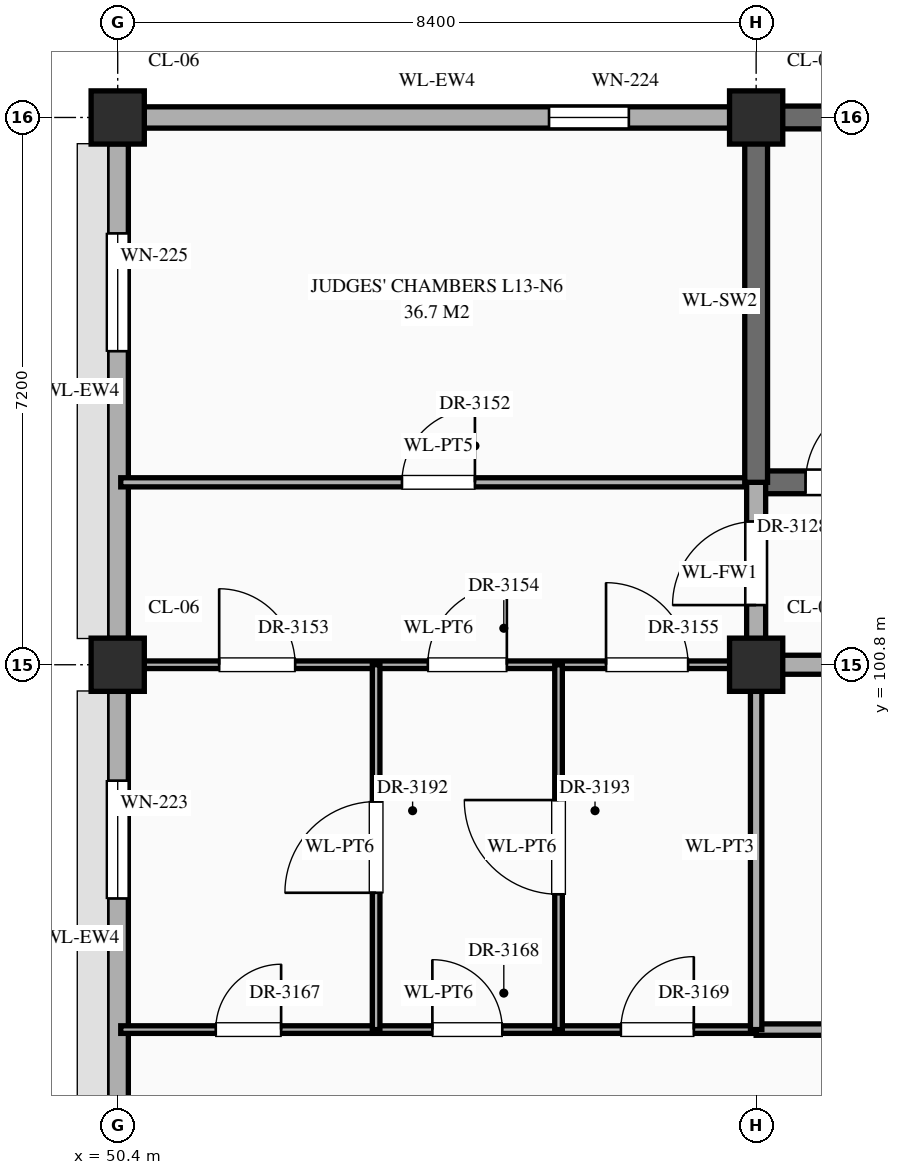
"""IFC4 building model, lengths in metres.
Left out: names, types, materials, properties, quantities, classifications, styles, units other than length and angle.
Written with IfcOpenShell. Run it as: python <this file> out.ifc"""

import sys

from ifc_helpers import new_model, si_unit, direction, frame, frame_2d, origin, origin_2d, place, context, subcontext, project, spatial, rectangle, extrude, element, fill, save


model = new_model("IFC4")
c1 = context("Model", 3, precision=1e-05, world=origin(), true_north=direction((0.0, 1.0)))
c2 = subcontext(c1, "Body", "Model", "MODEL_VIEW")
j1 = project(units=[si_unit("LENGTHUNIT", "METRE"), si_unit("PLANEANGLEUNIT", "RADIAN")], contexts=[c1])
p1 = place(None, origin())
s1 = spatial("IfcSite", under=j1, at=p1, CompositionType="ELEMENT")
p2 = place(p1, origin())
s2 = spatial("IfcBuilding", under=s1, at=p2, CompositionType="ELEMENT")
p3 = place(p2, frame((0.0, 0.0, 56.1)))
s3 = spatial("IfcBuildingStorey", under=s2, at=p3, CompositionType="ELEMENT", Elevation=56.1)
for number, where, z_axis, x_axis in (
    (1, (50.4, 100.8, 0.0), (0.0, 0.0, 1.0), (1.0, 0.0, 0.0)),
    (2, (50.4, 108.0, 0.0), (0.0, 0.0, 1.0), (1.0, 0.0, 0.0)),
    (3, (58.8, 100.8, 0.0), (0.0, 0.0, 1.0), (1.0, 0.0, 0.0)),
    (4, (58.8, 108.0, 0.0), (0.0, 0.0, 1.0), (1.0, 0.0, 0.0)),
):
    element("IfcColumn", number, at=place(p3, frame(where, z_axis=z_axis, x_axis=x_axis)), inside=s3, PredefinedType="COLUMN", context=c2, shape_type="SweptSolid", body=[
        extrude(rectangle(XDim=0.7, YDim=0.7, at=origin_2d()), origin(), (0.0, 0.0, 1.0), 4.2),
    ])
p4 = place(p3, frame((50.4, 93.945, 0.0), z_axis=(0.0, 0.0, 1.0), x_axis=(0.0, 1.0, 0.0)))
e5 = element("IfcWall", 5, at=p4, inside=s3, PredefinedType="STANDARD", context=c2, shape_type="SweptSolid", body=[
    extrude(rectangle(XDim=6.51, YDim=0.28, at=frame_2d((3.255, 0.0))), origin(), (0.0, 0.0, 1.0), 3.2),
])
p5 = place(p4, frame((3.78, 0.0, 0.55)))
e6 = element("IfcOpeningElement", 6, at=p5, cuts=e5, PredefinedType="OPENING", context=c2, shape_type="SweptSolid", body=[
    extrude(rectangle(XDim=1.55, YDim=1.92, at=frame_2d((0.775, 0.96))), frame((0.0, 0.152, 0.0), z_axis=(0.0, -1.0, 0.0), x_axis=(1.0, 0.0, 0.0)), (0.0, 0.0, 1.0), 0.304),
])
p6 = place(p3, frame((50.745, 108.0, 0.0), z_axis=(0.0, 0.0, 1.0), x_axis=(1.0, 0.0, 0.0)))
e7 = element("IfcWall", 7, at=p6, inside=s3, PredefinedType="STANDARD", context=c2, shape_type="SweptSolid", body=[
    extrude(rectangle(XDim=7.71, YDim=0.28, at=frame_2d((3.855, 0.0))), origin(), (0.0, 0.0, 1.0), 3.2),
])
p7 = place(p6, frame((5.33, 0.0, 0.55)))
e8 = element("IfcOpeningElement", 8, at=p7, cuts=e7, PredefinedType="OPENING", context=c2, shape_type="SweptSolid", body=[
    extrude(rectangle(XDim=1.05, YDim=2.12, at=frame_2d((0.525, 1.06))), frame((0.0, 0.152, 0.0), z_axis=(0.0, -1.0, 0.0), x_axis=(1.0, 0.0, 0.0)), (0.0, 0.0, 1.0), 0.304),
])
p8 = place(p3, frame((50.4, 101.145, 0.0), z_axis=(0.0, 0.0, 1.0), x_axis=(0.0, 1.0, 0.0)))
e9 = element("IfcWall", 9, at=p8, inside=s3, PredefinedType="STANDARD", context=c2, shape_type="SweptSolid", body=[
    extrude(rectangle(XDim=6.51, YDim=0.28, at=frame_2d((3.255, 0.0))), origin(), (0.0, 0.0, 1.0), 3.2),
])
p9 = place(p8, frame((3.78, 0.0, 0.55)))
e10 = element("IfcOpeningElement", 10, at=p9, cuts=e9, PredefinedType="OPENING", context=c2, shape_type="SweptSolid", body=[
    extrude(rectangle(XDim=1.55, YDim=2.12, at=frame_2d((0.775, 1.06))), frame((0.0, 0.152, 0.0), z_axis=(0.0, -1.0, 0.0), x_axis=(1.0, 0.0, 0.0)), (0.0, 0.0, 1.0), 0.304),
])
p10 = place(p3, frame((59.145, 108.0, 0.0), z_axis=(0.0, 0.0, 1.0), x_axis=(1.0, 0.0, 0.0)))
e11 = element("IfcWall", 11, at=p10, inside=s3, PredefinedType="SHEAR", context=c2, shape_type="SweptSolid", body=[
    extrude(rectangle(XDim=7.71, YDim=0.3, at=frame_2d((3.855, 0.0))), origin(), (0.0, 0.0, 1.0), 3.96),
])
p11 = place(p3, frame((50.44, 96.0, 0.0), z_axis=(0.0, 0.0, 1.0), x_axis=(1.0, 0.0, 0.0)))
e12 = element("IfcWall", 12, at=p11, inside=s3, PredefinedType="STANDARD", context=c2, shape_type="SweptSolid", body=[
    extrude(rectangle(XDim=8.36, YDim=0.1, at=frame_2d((4.18, 0.0))), origin(), (0.0, 0.0, 1.0), 3.85),
])
p12 = place(p11, frame((1.25, 0.0, 0.0)))
e13 = element("IfcOpeningElement", 13, at=p12, cuts=e12, PredefinedType="OPENING", context=c2, shape_type="SweptSolid", body=[
    extrude(rectangle(XDim=0.86, YDim=2.1, at=frame_2d((0.43, 1.05))), frame((0.0, 0.062, 0.0), z_axis=(0.0, -1.0, 0.0), x_axis=(1.0, 0.0, 0.0)), (0.0, 0.0, 1.0), 0.124),
])
p13 = place(p11, frame((4.1, 0.0, 0.0)))
e14 = element("IfcOpeningElement", 14, at=p13, cuts=e12, PredefinedType="OPENING", context=c2, shape_type="SweptSolid", body=[
    extrude(rectangle(XDim=0.92, YDim=2.15, at=frame_2d((0.46, 1.075))), frame((0.0, 0.062, 0.0), z_axis=(0.0, -1.0, 0.0), x_axis=(1.0, 0.0, 0.0)), (0.0, 0.0, 1.0), 0.124),
])
p14 = place(p11, frame((6.58, 0.0, 0.0)))
e15 = element("IfcOpeningElement", 15, at=p14, cuts=e12, PredefinedType="OPENING", context=c2, shape_type="SweptSolid", body=[
    extrude(rectangle(XDim=0.96, YDim=2.2, at=frame_2d((0.48, 1.1))), frame((0.0, 0.062, 0.0), z_axis=(0.0, -1.0, 0.0), x_axis=(1.0, 0.0, 0.0)), (0.0, 0.0, 1.0), 0.124),
])
p15 = place(p3, frame((58.8, 96.0, 0.0), z_axis=(0.0, 0.0, 1.0), x_axis=(1.0, 0.0, 0.0)))
e16 = element("IfcWall", 16, at=p15, inside=s3, PredefinedType="STANDARD", context=c2, shape_type="SweptSolid", body=[
    extrude(rectangle(XDim=25.2, YDim=0.15, at=frame_2d((12.6, 0.0))), origin(), (0.0, 0.0, 1.0), 3.96),
])
p16 = place(p15, frame((3.7, 0.0, 0.0)))
e17 = element("IfcOpeningElement", 17, at=p16, cuts=e16, PredefinedType="OPENING", context=c2, shape_type="SweptSolid", body=[
    extrude(rectangle(XDim=1.0, YDim=2.25, at=frame_2d((0.5, 1.125))), frame((0.0, 0.087, 0.0), z_axis=(0.0, -1.0, 0.0), x_axis=(1.0, 0.0, 0.0)), (0.0, 0.0, 1.0), 0.174),
])
p17 = place(p15, frame((12.08, 0.0, 0.0)))
e18 = element("IfcOpeningElement", 18, at=p17, cuts=e16, PredefinedType="OPENING", context=c2, shape_type="SweptSolid", body=[
    extrude(rectangle(XDim=1.04, YDim=2.2, at=frame_2d((0.52, 1.1))), frame((0.0, 0.087, 0.0), z_axis=(0.0, -1.0, 0.0), x_axis=(1.0, 0.0, 0.0)), (0.0, 0.0, 1.0), 0.174),
])
p18 = place(p15, frame((20.46, 0.0, 0.0)))
e19 = element("IfcOpeningElement", 19, at=p18, cuts=e16, PredefinedType="OPENING", context=c2, shape_type="SweptSolid", body=[
    extrude(rectangle(XDim=1.08, YDim=2.25, at=frame_2d((0.54, 1.125))), frame((0.0, 0.087, 0.0), z_axis=(0.0, -1.0, 0.0), x_axis=(1.0, 0.0, 0.0)), (0.0, 0.0, 1.0), 0.174),
])
p19 = place(p3, frame((50.44, 100.8, 0.0), z_axis=(0.0, 0.0, 1.0), x_axis=(1.0, 0.0, 0.0)))
e20 = element("IfcWall", 20, at=p19, inside=s3, PredefinedType="STANDARD", context=c2, shape_type="SweptSolid", body=[
    extrude(rectangle(XDim=8.36, YDim=0.1, at=frame_2d((4.18, 0.0))), origin(), (0.0, 0.0, 1.0), 3.0),
])
p20 = place(p19, frame((1.295, 0.0, 0.0)))
e21 = element("IfcOpeningElement", 21, at=p20, cuts=e20, PredefinedType="OPENING", context=c2, shape_type="SweptSolid", body=[
    extrude(rectangle(XDim=1.0, YDim=2.25, at=frame_2d((0.5, 1.125))), frame((0.0, 0.062, 0.0), z_axis=(0.0, -1.0, 0.0), x_axis=(1.0, 0.0, 0.0)), (0.0, 0.0, 1.0), 0.124),
])
p21 = place(p19, frame((4.04, 0.0, 0.0)))
e22 = element("IfcOpeningElement", 22, at=p21, cuts=e20, PredefinedType="OPENING", context=c2, shape_type="SweptSolid", body=[
    extrude(rectangle(XDim=1.04, YDim=2.2, at=frame_2d((0.52, 1.1))), frame((0.0, 0.062, 0.0), z_axis=(0.0, -1.0, 0.0), x_axis=(1.0, 0.0, 0.0)), (0.0, 0.0, 1.0), 0.124),
])
p22 = place(p19, frame((6.385, 0.0, 0.0)))
e23 = element("IfcOpeningElement", 23, at=p22, cuts=e20, PredefinedType="OPENING", context=c2, shape_type="SweptSolid", body=[
    extrude(rectangle(XDim=1.08, YDim=2.25, at=frame_2d((0.54, 1.125))), frame((0.0, 0.062, 0.0), z_axis=(0.0, -1.0, 0.0), x_axis=(1.0, 0.0, 0.0)), (0.0, 0.0, 1.0), 0.124),
])
p23 = place(p3, frame((58.8, 100.8, 0.0), z_axis=(0.0, 0.0, 1.0), x_axis=(1.0, 0.0, 0.0)))
e24 = element("IfcWall", 24, at=p23, inside=s3, PredefinedType="STANDARD", context=c2, shape_type="SweptSolid", body=[
    extrude(rectangle(XDim=12.6, YDim=0.25, at=frame_2d((6.3, 0.0))), origin(), (0.0, 0.0, 1.0), 3.11),
])
p24 = place(p23, frame((3.7, 0.0, 0.0)))
e25 = element("IfcOpeningElement", 25, at=p24, cuts=e24, PredefinedType="OPENING", context=c2, shape_type="SweptSolid", body=[
    extrude(rectangle(XDim=1.0, YDim=2.2, at=frame_2d((0.5, 1.1))), frame((0.0, 0.137, 0.0), z_axis=(0.0, -1.0, 0.0), x_axis=(1.0, 0.0, 0.0)), (0.0, 0.0, 1.0), 0.274),
])
p25 = place(p3, frame((50.44, 103.2, 0.0), z_axis=(0.0, 0.0, 1.0), x_axis=(1.0, 0.0, 0.0)))
e26 = element("IfcWall", 26, at=p25, inside=s3, PredefinedType="STANDARD", context=c2, shape_type="SweptSolid", body=[
    extrude(rectangle(XDim=8.36, YDim=0.12, at=frame_2d((4.18, 0.0))), origin(), (0.0, 0.0, 1.0), 3.85),
])
p26 = place(p25, frame((3.7, 0.0, 0.0)))
e27 = element("IfcOpeningElement", 27, at=p26, cuts=e26, PredefinedType="OPENING", context=c2, shape_type="SweptSolid", body=[
    extrude(rectangle(XDim=0.96, YDim=2.2, at=frame_2d((0.48, 1.1))), frame((0.0, 0.072, 0.0), z_axis=(0.0, -1.0, 0.0), x_axis=(1.0, 0.0, 0.0)), (0.0, 0.0, 1.0), 0.144),
])
p27 = place(p3, frame((58.8, 103.2, 0.0), z_axis=(0.0, 0.0, 1.0), x_axis=(1.0, 0.0, 0.0)))
e28 = element("IfcWall", 28, at=p27, inside=s3, PredefinedType="SHEAR", context=c2, shape_type="SweptSolid", body=[
    extrude(rectangle(XDim=8.4, YDim=0.3, at=frame_2d((4.2, 0.0))), origin(), (0.0, 0.0, 1.0), 3.96),
])
p28 = place(p27, frame((0.65, 0.0, 0.0)))
e29 = element("IfcOpeningElement", 29, at=p28, cuts=e28, PredefinedType="OPENING", context=c2, shape_type="SweptSolid", body=[
    extrude(rectangle(XDim=1.1, YDim=2.2, at=frame_2d((0.55, 1.1))), frame((0.0, 0.162, 0.0), z_axis=(0.0, -1.0, 0.0), x_axis=(1.0, 0.0, 0.0)), (0.0, 0.0, 1.0), 0.324),
])
p29 = place(p3, frame((53.8, 96.0, 0.0), z_axis=(0.0, 0.0, 1.0), x_axis=(0.0, 1.0, 0.0)))
e30 = element("IfcWall", 30, at=p29, inside=s3, PredefinedType="STANDARD", context=c2, shape_type="SweptSolid", body=[
    extrude(rectangle(XDim=4.8, YDim=0.1, at=frame_2d((2.4, 0.0))), origin(), (0.0, 0.0, 1.0), 3.85),
])
p30 = place(p29, frame((1.8, 0.0, 0.0)))
e31 = element("IfcOpeningElement", 31, at=p30, cuts=e30, PredefinedType="OPENING", context=c2, shape_type="SweptSolid", body=[
    extrude(rectangle(XDim=1.2, YDim=2.35, at=frame_2d((0.6, 1.175))), frame((0.0, 0.062, 0.0), z_axis=(0.0, -1.0, 0.0), x_axis=(1.0, 0.0, 0.0)), (0.0, 0.0, 1.0), 0.124),
])
p31 = place(p3, frame((56.2, 96.0, 0.0), z_axis=(0.0, 0.0, 1.0), x_axis=(0.0, 1.0, 0.0)))
e32 = element("IfcWall", 32, at=p31, inside=s3, PredefinedType="STANDARD", context=c2, shape_type="SweptSolid", body=[
    extrude(rectangle(XDim=4.8, YDim=0.1, at=frame_2d((2.4, 0.0))), origin(), (0.0, 0.0, 1.0), 3.85),
])
p32 = place(p31, frame((1.78, 0.0, 0.0)))
e33 = element("IfcOpeningElement", 33, at=p32, cuts=e32, PredefinedType="OPENING", context=c2, shape_type="SweptSolid", body=[
    extrude(rectangle(XDim=1.24, YDim=2.3, at=frame_2d((0.62, 1.15))), frame((0.0, 0.062, 0.0), z_axis=(0.0, -1.0, 0.0), x_axis=(1.0, 0.0, 0.0)), (0.0, 0.0, 1.0), 0.124),
])
p33 = place(p3, frame((58.8, 96.0, 0.0), z_axis=(0.0, 0.0, 1.0), x_axis=(0.0, 1.0, 0.0)))
e34 = element("IfcWall", 34, at=p33, inside=s3, PredefinedType="STANDARD", context=c2, shape_type="SweptSolid", body=[
    extrude(rectangle(XDim=4.8, YDim=0.15, at=frame_2d((2.4, 0.0))), origin(), (0.0, 0.0, 1.0), 3.1),
])
p34 = place(p3, frame((58.8, 100.8, 0.0), z_axis=(0.0, 0.0, 1.0), x_axis=(0.0, 1.0, 0.0)))
e35 = element("IfcWall", 35, at=p34, inside=s3, PredefinedType="STANDARD", context=c2, shape_type="SweptSolid", body=[
    extrude(rectangle(XDim=2.4, YDim=0.25, at=frame_2d((1.2, 0.0))), origin(), (0.0, 0.0, 1.0), 3.1),
])
p35 = place(p34, frame((0.785, 0.0, 0.0)))
e36 = element("IfcOpeningElement", 36, at=p35, cuts=e35, PredefinedType="OPENING", context=c2, shape_type="SweptSolid", body=[
    extrude(rectangle(XDim=1.1, YDim=2.2, at=frame_2d((0.55, 1.1))), frame((0.0, 0.137, 0.0), z_axis=(0.0, -1.0, 0.0), x_axis=(1.0, 0.0, 0.0)), (0.0, 0.0, 1.0), 0.274),
])
p36 = place(p3, frame((58.8, 103.2, 0.0), z_axis=(0.0, 0.0, 1.0), x_axis=(0.0, 1.0, 0.0)))
e37 = element("IfcWall", 37, at=p36, inside=s3, PredefinedType="SHEAR", context=c2, shape_type="SweptSolid", body=[
    extrude(rectangle(XDim=4.76, YDim=0.3, at=frame_2d((2.38, 0.0))), origin(), (0.0, 0.0, 1.0), 3.85),
])
p37 = place(p5, origin())
e38 = element("IfcWindow", 38, at=p37, inside=s3, PartitioningType="SINGLE_PANEL", PredefinedType="WINDOW", context=c2, shape_type="SweptSolid", body=[
    extrude(rectangle(XDim=1.55, YDim=1.92, at=frame_2d((0.775, 0.96))), frame((0.0, 0.03, 0.0), z_axis=(0.0, -1.0, 0.0), x_axis=(1.0, 0.0, 0.0)), (0.0, 0.0, 1.0), 0.06),
])
fill(e6, e38)
p38 = place(p7, origin())
e39 = element("IfcWindow", 39, at=p38, inside=s3, PartitioningType="SINGLE_PANEL", PredefinedType="WINDOW", context=c2, shape_type="SweptSolid", body=[
    extrude(rectangle(XDim=1.05, YDim=2.12, at=frame_2d((0.525, 1.06))), frame((0.0, 0.03, 0.0), z_axis=(0.0, -1.0, 0.0), x_axis=(1.0, 0.0, 0.0)), (0.0, 0.0, 1.0), 0.06),
])
fill(e8, e39)
p39 = place(p9, origin())
e40 = element("IfcWindow", 40, at=p39, inside=s3, PartitioningType="SINGLE_PANEL", PredefinedType="WINDOW", context=c2, shape_type="SweptSolid", body=[
    extrude(rectangle(XDim=1.55, YDim=2.12, at=frame_2d((0.775, 1.06))), frame((0.0, 0.03, 0.0), z_axis=(0.0, -1.0, 0.0), x_axis=(1.0, 0.0, 0.0)), (0.0, 0.0, 1.0), 0.06),
])
fill(e10, e40)
p40 = place(p28, origin())
e41 = element("IfcDoor", 41, at=p40, inside=s3, OperationType="SINGLE_SWING_RIGHT", PredefinedType="DOOR", context=c2, shape_type="SweptSolid", body=[
    extrude(rectangle(XDim=1.1, YDim=2.2, at=frame_2d((0.55, 1.1))), frame((0.0, 0.025, 0.0), z_axis=(0.0, -1.0, 0.0), x_axis=(1.0, 0.0, 0.0)), (0.0, 0.0, 1.0), 0.05),
])
fill(e29, e41)
p41 = place(p35, origin())
e42 = element("IfcDoor", 42, at=p41, inside=s3, OperationType="SINGLE_SWING_LEFT", PredefinedType="DOOR", context=c2, shape_type="SweptSolid", body=[
    extrude(rectangle(XDim=1.1, YDim=2.2, at=frame_2d((0.55, 1.1))), frame((0.0, 0.025, 0.0), z_axis=(0.0, -1.0, 0.0), x_axis=(1.0, 0.0, 0.0)), (0.0, 0.0, 1.0), 0.05),
])
fill(e36, e42)
p42 = place(p26, origin())
e43 = element("IfcDoor", 43, at=p42, inside=s3, OperationType="SINGLE_SWING_RIGHT", PredefinedType="DOOR", context=c2, shape_type="SweptSolid", body=[
    extrude(rectangle(XDim=0.96, YDim=2.2, at=frame_2d((0.48, 1.1))), frame((0.0, 0.025, 0.0), z_axis=(0.0, -1.0, 0.0), x_axis=(1.0, 0.0, 0.0)), (0.0, 0.0, 1.0), 0.05),
])
fill(e27, e43)
p43 = place(p20, origin())
e44 = element("IfcDoor", 44, at=p43, inside=s3, OperationType="SINGLE_SWING_LEFT", PredefinedType="DOOR", context=c2, shape_type="SweptSolid", body=[
    extrude(rectangle(XDim=1.0, YDim=2.25, at=frame_2d((0.5, 1.125))), frame((0.0, 0.025, 0.0), z_axis=(0.0, -1.0, 0.0), x_axis=(1.0, 0.0, 0.0)), (0.0, 0.0, 1.0), 0.05),
])
fill(e21, e44)
p44 = place(p21, origin())
e45 = element("IfcDoor", 45, at=p44, inside=s3, OperationType="SINGLE_SWING_RIGHT", PredefinedType="DOOR", context=c2, shape_type="SweptSolid", body=[
    extrude(rectangle(XDim=1.04, YDim=2.2, at=frame_2d((0.52, 1.1))), frame((0.0, 0.025, 0.0), z_axis=(0.0, -1.0, 0.0), x_axis=(1.0, 0.0, 0.0)), (0.0, 0.0, 1.0), 0.05),
])
fill(e22, e45)
p45 = place(p22, origin())
e46 = element("IfcDoor", 46, at=p45, inside=s3, OperationType="SINGLE_SWING_LEFT", PredefinedType="DOOR", context=c2, shape_type="SweptSolid", body=[
    extrude(rectangle(XDim=1.08, YDim=2.25, at=frame_2d((0.54, 1.125))), frame((0.0, 0.025, 0.0), z_axis=(0.0, -1.0, 0.0), x_axis=(1.0, 0.0, 0.0)), (0.0, 0.0, 1.0), 0.05),
])
fill(e23, e46)
p46 = place(p12, origin())
e47 = element("IfcDoor", 47, at=p46, inside=s3, OperationType="SINGLE_SWING_RIGHT", PredefinedType="DOOR", context=c2, shape_type="SweptSolid", body=[
    extrude(rectangle(XDim=0.86, YDim=2.1, at=frame_2d((0.43, 1.05))), frame((0.0, 0.025, 0.0), z_axis=(0.0, -1.0, 0.0), x_axis=(1.0, 0.0, 0.0)), (0.0, 0.0, 1.0), 0.05),
])
fill(e13, e47)
p47 = place(p13, origin())
e48 = element("IfcDoor", 48, at=p47, inside=s3, OperationType="SINGLE_SWING_LEFT", PredefinedType="DOOR", context=c2, shape_type="SweptSolid", body=[
    extrude(rectangle(XDim=0.92, YDim=2.15, at=frame_2d((0.46, 1.075))), frame((0.0, 0.025, 0.0), z_axis=(0.0, -1.0, 0.0), x_axis=(1.0, 0.0, 0.0)), (0.0, 0.0, 1.0), 0.05),
])
fill(e14, e48)
p48 = place(p14, origin())
e49 = element("IfcDoor", 49, at=p48, inside=s3, OperationType="SINGLE_SWING_RIGHT", PredefinedType="DOOR", context=c2, shape_type="SweptSolid", body=[
    extrude(rectangle(XDim=0.96, YDim=2.2, at=frame_2d((0.48, 1.1))), frame((0.0, 0.025, 0.0), z_axis=(0.0, -1.0, 0.0), x_axis=(1.0, 0.0, 0.0)), (0.0, 0.0, 1.0), 0.05),
])
fill(e15, e49)
p49 = place(p30, origin())
e50 = element("IfcDoor", 50, at=p49, inside=s3, OperationType="SINGLE_SWING_LEFT", PredefinedType="DOOR", context=c2, shape_type="SweptSolid", body=[
    extrude(rectangle(XDim=1.2, YDim=2.35, at=frame_2d((0.6, 1.175))), frame((0.0, 0.025, 0.0), z_axis=(0.0, -1.0, 0.0), x_axis=(1.0, 0.0, 0.0)), (0.0, 0.0, 1.0), 0.05),
])
fill(e31, e50)
p50 = place(p32, origin())
e51 = element("IfcDoor", 51, at=p50, inside=s3, OperationType="SINGLE_SWING_RIGHT", PredefinedType="DOOR", context=c2, shape_type="SweptSolid", body=[
    extrude(rectangle(XDim=1.24, YDim=2.3, at=frame_2d((0.62, 1.15))), frame((0.0, 0.025, 0.0), z_axis=(0.0, -1.0, 0.0), x_axis=(1.0, 0.0, 0.0)), (0.0, 0.0, 1.0), 0.05),
])
fill(e33, e51)
save(model, sys.argv[1])
